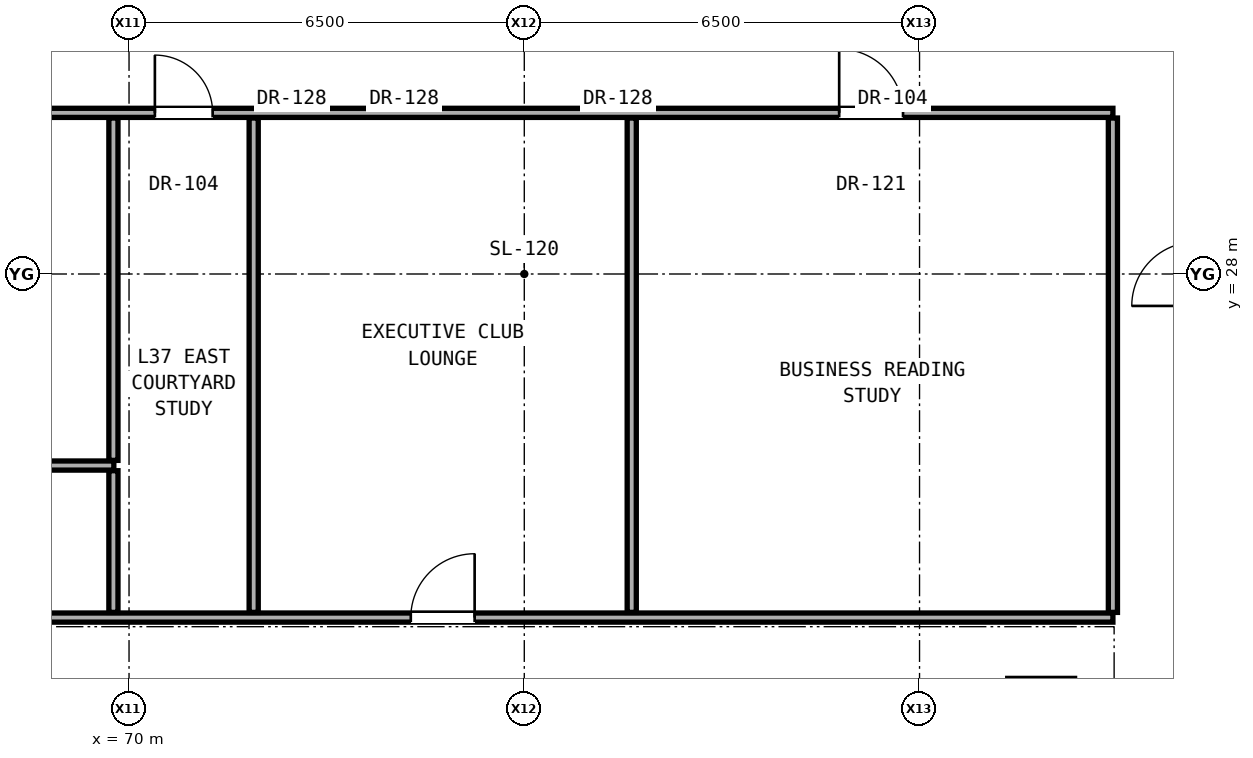
"""IFC4 building model, lengths in metres.
Left out: names, types, materials, properties, quantities, classifications, styles, units other than length and angle.
Written with IfcOpenShell. Run it as: python <this file> out.ifc"""

import sys

from ifc_helpers import new_model, si_unit, direction, frame, frame_2d, origin, place, context, subcontext, project, spatial, rectangle, extrude, element, fill, save


model = new_model("IFC4")
c1 = context("Model", 3, precision=1e-05, world=origin(), true_north=direction((0.0, 1.0)))
c2 = subcontext(c1, "Body", "Model", "MODEL_VIEW")
j1 = project(units=[si_unit("LENGTHUNIT", "METRE"), si_unit("PLANEANGLEUNIT", "RADIAN")], contexts=[c1])
p1 = place(None, origin())
s1 = spatial("IfcSite", under=j1, at=p1, CompositionType="ELEMENT")
p2 = place(p1, origin())
s2 = spatial("IfcBuilding", under=s1, at=p2, CompositionType="ELEMENT")
p3 = place(p2, frame((0.0, 0.0, 131.3)))
s3 = spatial("IfcBuildingStorey", under=s2, at=p3, CompositionType="ELEMENT", Elevation=131.3)
p4 = place(p3, frame((66.68, 22.35, 0.0), z_axis=(0.0, 0.0, 1.0), x_axis=(1.0, 0.0, 0.0)))
e1 = element("IfcWall", 1, at=p4, inside=s3, PredefinedType="PARTITIONING", context=c2, shape_type="SweptSolid", body=[
    extrude(rectangle(XDim=19.5, YDim=0.15, at=frame_2d((9.75, 0.0))), origin(), (0.0, 0.0, 1.0), 2.216),
])
p5 = place(p4, frame((7.954, 0.0, 0.0)))
e2 = element("IfcOpeningElement", 2, at=p5, cuts=e1, PredefinedType="OPENING", context=c2, shape_type="SweptSolid", body=[
    extrude(rectangle(XDim=1.05, YDim=2.2, at=frame_2d((0.525, 1.1))), frame((0.0, 0.085, 0.0), z_axis=(0.0, -1.0, 0.0), x_axis=(1.0, 0.0, 0.0)), (0.0, 0.0, 1.0), 0.17),
])
p6 = place(p3, frame((66.68, 24.85, 0.0), z_axis=(0.0, 0.0, 1.0), x_axis=(1.0, 0.0, 0.0)))
e3 = element("IfcWall", 3, at=p6, inside=s3, PredefinedType="PARTITIONING", context=c2, shape_type="SweptSolid", body=[
    extrude(rectangle(XDim=3.07, YDim=0.15, at=frame_2d((1.535, 0.0))), origin(), (0.0, 0.0, 1.0), 2.216),
])
p7 = place(p3, frame((66.68, 30.65, 0.0), z_axis=(0.0, 0.0, 1.0), x_axis=(1.0, 0.0, 0.0)))
e4 = element("IfcWall", 4, at=p7, inside=s3, PredefinedType="PARTITIONING", context=c2, shape_type="SweptSolid", body=[
    extrude(rectangle(XDim=19.5, YDim=0.15, at=frame_2d((9.75, 0.0))), origin(), (0.0, 0.0, 1.0), 2.216),
])
p8 = place(p7, frame((3.745, 0.0, 0.0)))
e5 = element("IfcOpeningElement", 5, at=p8, cuts=e4, PredefinedType="OPENING", context=c2, shape_type="SweptSolid", body=[
    extrude(rectangle(XDim=0.95, YDim=2.15, at=frame_2d((0.475, 1.075))), frame((0.0, 0.085, 0.0), z_axis=(0.0, -1.0, 0.0), x_axis=(1.0, 0.0, 0.0)), (0.0, 0.0, 1.0), 0.17),
])
p9 = place(p7, frame((14.999, 0.0, 0.0)))
e6 = element("IfcOpeningElement", 6, at=p9, cuts=e4, PredefinedType="OPENING", context=c2, shape_type="SweptSolid", body=[
    extrude(rectangle(XDim=1.05, YDim=2.2, at=frame_2d((0.525, 1.1))), frame((0.0, 0.085, 0.0), z_axis=(0.0, -1.0, 0.0), x_axis=(1.0, 0.0, 0.0)), (0.0, 0.0, 1.0), 0.17),
])
p10 = place(p3, frame((69.743, 22.435, 0.0), z_axis=(0.0, 0.0, 1.0), x_axis=(0.0, 1.0, 0.0)))
e7 = element("IfcWall", 7, at=p10, inside=s3, PredefinedType="PARTITIONING", context=c2, shape_type="SweptSolid", body=[
    extrude(rectangle(XDim=2.33, YDim=0.15, at=frame_2d((1.165, 0.0))), origin(), (0.0, 0.0, 1.0), 3.08),
])
p11 = place(p3, frame((69.743, 24.935, 0.0), z_axis=(0.0, 0.0, 1.0), x_axis=(0.0, 1.0, 0.0)))
e8 = element("IfcWall", 8, at=p11, inside=s3, PredefinedType="PARTITIONING", context=c2, shape_type="SweptSolid", body=[
    extrude(rectangle(XDim=5.63, YDim=0.15, at=frame_2d((2.815, 0.0))), origin(), (0.0, 0.0, 1.0), 2.216),
])
for number, where, z_axis, x_axis in (
    (9, (72.05, 22.435, 0.0), (0.0, 0.0, 1.0), (0.0, 1.0, 0.0)),
    (10, (78.267, 22.435, 0.0), (0.0, 0.0, 1.0), (0.0, 1.0, 0.0)),
):
    element("IfcWall", number, at=place(p3, frame(where, z_axis=z_axis, x_axis=x_axis)), inside=s3, PredefinedType="PARTITIONING", context=c2, shape_type="SweptSolid", body=[
        extrude(rectangle(XDim=8.13, YDim=0.15, at=frame_2d((4.065, 0.0))), origin(), (0.0, 0.0, 1.0), 2.216),
    ])
p12 = place(p3, frame((86.18, 22.435, 0.0), z_axis=(0.0, 0.0, 1.0), x_axis=(0.0, 1.0, 0.0)))
e11 = element("IfcWall", 11, at=p12, inside=s3, PredefinedType="PARTITIONING", context=c2, shape_type="SweptSolid", body=[
    extrude(rectangle(XDim=8.13, YDim=0.15, at=frame_2d((4.065, 0.0))), origin(), (0.0, 0.0, 1.0), 2.376),
])
p13 = place(p8, origin())
e12 = element("IfcDoor", 12, at=p13, inside=s3, OperationType="SINGLE_SWING_LEFT", PredefinedType="DOOR", context=c2, shape_type="SweptSolid", body=[
    extrude(rectangle(XDim=0.95, YDim=2.15, at=frame_2d((0.475, 1.075))), frame((0.0, 0.025, 0.0), z_axis=(0.0, -1.0, 0.0), x_axis=(1.0, 0.0, 0.0)), (0.0, 0.0, 1.0), 0.05),
])
fill(e5, e12)
p14 = place(p5, origin())
e13 = element("IfcDoor", 13, at=p14, inside=s3, OperationType="SINGLE_SWING_RIGHT", PredefinedType="DOOR", context=c2, shape_type="SweptSolid", body=[
    extrude(rectangle(XDim=1.05, YDim=2.2, at=frame_2d((0.525, 1.1))), frame((0.0, 0.025, 0.0), z_axis=(0.0, -1.0, 0.0), x_axis=(1.0, 0.0, 0.0)), (0.0, 0.0, 1.0), 0.05),
])
fill(e2, e13)
p15 = place(p9, origin())
e14 = element("IfcDoor", 14, at=p15, inside=s3, OperationType="SINGLE_SWING_LEFT", PredefinedType="DOOR", context=c2, shape_type="SweptSolid", body=[
    extrude(rectangle(XDim=1.05, YDim=2.2, at=frame_2d((0.525, 1.1))), frame((0.0, 0.025, 0.0), z_axis=(0.0, -1.0, 0.0), x_axis=(1.0, 0.0, 0.0)), (0.0, 0.0, 1.0), 0.05),
])
fill(e6, e14)
save(model, sys.argv[1])
